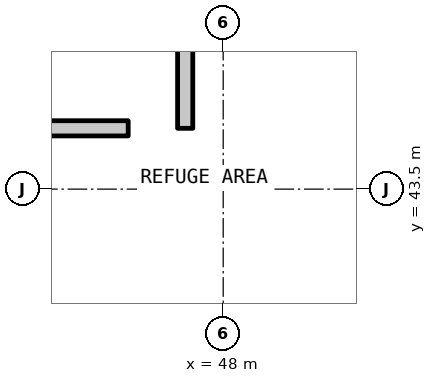
"""IFC4 building model, lengths in metres.
Left out: names, types, materials, properties, quantities, classifications, styles, units other than length and angle.
Written with IfcOpenShell. Run it as: python <this file> out.ifc"""

import sys

from ifc_helpers import new_model, si_unit, direction, frame, frame_2d, origin, place, context, subcontext, project, spatial, rectangle, extrude, element, save


model = new_model("IFC4")
c1 = context("Model", 3, precision=1e-05, world=origin(), true_north=direction((0.0, 1.0)))
c2 = subcontext(c1, "Body", "Model", "MODEL_VIEW")
j1 = project(units=[si_unit("LENGTHUNIT", "METRE"), si_unit("PLANEANGLEUNIT", "RADIAN")], contexts=[c1])
p1 = place(None, origin())
s1 = spatial("IfcSite", under=j1, at=p1, CompositionType="ELEMENT")
p2 = place(p1, origin())
s2 = spatial("IfcBuilding", under=s1, at=p2, CompositionType="ELEMENT")
p3 = place(p2, frame((0.0, 0.0, 6.0)))
s3 = spatial("IfcBuildingStorey", under=s2, at=p3, CompositionType="ELEMENT", Elevation=6.0)
p4 = place(p3, frame((42.552, 44.3, 0.0), z_axis=(0.0, 0.0, 1.0), x_axis=(1.0, 0.0, 0.0)))
e1 = element("IfcWall", 1, at=p4, inside=s3, PredefinedType="PARTITIONING", context=c2, shape_type="SweptSolid", body=[
    extrude(rectangle(XDim=4.198, YDim=0.2, at=frame_2d((2.099, 0.0))), origin(), (0.0, 0.0, 1.0), 4.95),
])
p5 = place(p3, frame((47.5, 49.1, 0.0), z_axis=(0.0, 0.0, 1.0), x_axis=(0.0, -1.0, 0.0)))
e2 = element("IfcWall", 2, at=p5, inside=s3, PredefinedType="PARTITIONING", context=c2, shape_type="SweptSolid", body=[
    extrude(rectangle(XDim=4.8, YDim=0.2, at=frame_2d((2.4, 0.0))), origin(), (0.0, 0.0, 1.0), 4.95),
])
p6 = place(p5, frame((1.6, 0.0, 0.0)))
e3 = element("IfcOpeningElement", 3, at=p6, cuts=e2, PredefinedType="OPENING", context=c2, shape_type="SweptSolid", body=[
    extrude(rectangle(XDim=1.5, YDim=2.1, at=frame_2d((0.75, 1.05))), frame((0.0, 0.11, 0.0), z_axis=(0.0, -1.0, 0.0), x_axis=(1.0, 0.0, 0.0)), (0.0, 0.0, 1.0), 0.22),
])
save(model, sys.argv[1])
